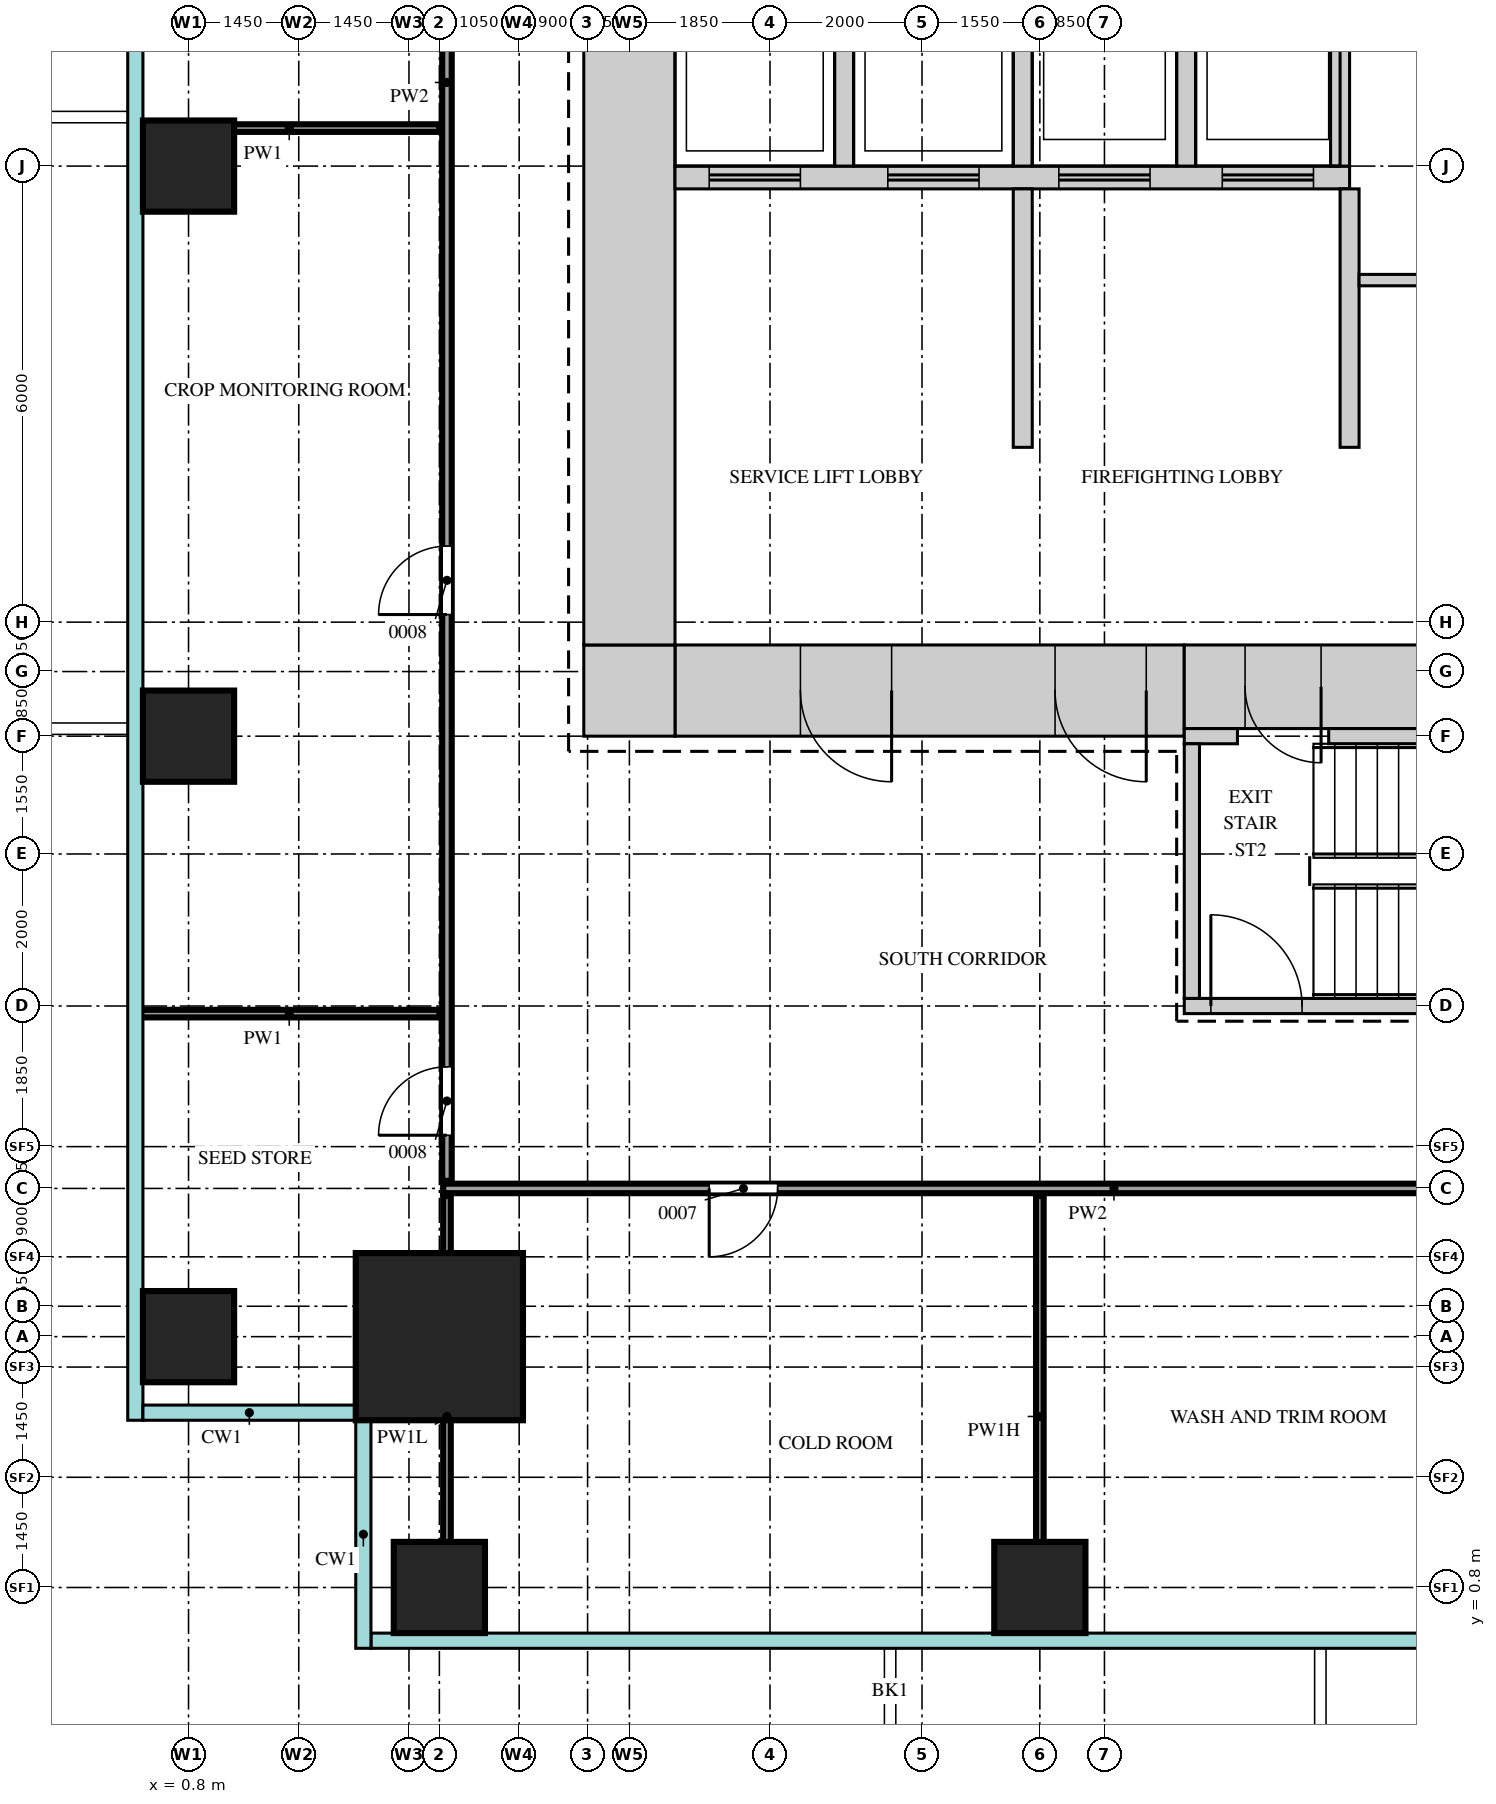
"""IFC4 building model, lengths in metres.
Left out: names, types, materials, properties, quantities, classifications, styles, units other than length and angle.
Written with IfcOpenShell. Run it as: python <this file> out.ifc"""

import sys

from ifc_helpers import new_model, si_unit, direction, frame, frame_2d, origin, origin_2d, place, context, subcontext, project, spatial, rectangle, extrude, source, transform, mapped, element, fill, save


model = new_model("IFC4")
c1 = context("Model", 3, precision=1e-05, world=origin(), true_north=direction((0.0, 1.0)))
c2 = subcontext(c1, "Body", "Model", "MODEL_VIEW")
j1 = project(units=[si_unit("LENGTHUNIT", "METRE"), si_unit("PLANEANGLEUNIT", "RADIAN")], contexts=[c1])
p1 = place(None, origin())
s1 = spatial("IfcSite", under=j1, at=p1, CompositionType="ELEMENT")
p2 = place(p1, origin())
s2 = spatial("IfcBuilding", under=s1, at=p2, CompositionType="ELEMENT")
p3 = place(p2, frame((0.0, 0.0, 37.5)))
s3 = spatial("IfcBuildingStorey", under=s2, at=p3, CompositionType="ELEMENT", Elevation=37.5)
m1 = source(origin(), c2, "Body", "SweptSolid", [
    extrude(rectangle(XDim=6.7, YDim=1.2, at=frame_2d((3.35, 0.0))), origin(), (0.0, 0.0, 1.0), 4.2),
])
p4 = place(p3, frame((7.2, 12.6, 0.0), z_axis=(0.0, 0.0, 1.0), x_axis=(1.0, 0.0, 0.0)))
e1 = element("IfcWall", 1, at=p4, inside=s3, PredefinedType="SHEAR", context=c2, shape_type="MappedRepresentation", body=[
    mapped(m1, transform((0.0, 0.0, 0.0))),
])
m2 = source(origin(), c2, "Body", "SweptSolid", [
    extrude(rectangle(XDim=1.2, YDim=2.1, at=frame_2d((0.6, 1.05))), frame((0.0, 0.61, 0.0), z_axis=(0.0, -1.0, 0.0), x_axis=(1.0, 0.0, 0.0)), (0.0, 0.0, 1.0), 1.22),
])
p5 = place(p4, frame((5.0, 0.0, 0.0)))
e2 = element("IfcOpeningElement", 2, at=p5, cuts=e1, PredefinedType="OPENING", context=c2, shape_type="MappedRepresentation", body=[
    mapped(m2, transform((0.0, 0.0, 0.0))),
])
p6 = place(p4, frame((1.65, 0.0, 0.0)))
e3 = element("IfcOpeningElement", 3, at=p6, cuts=e1, PredefinedType="OPENING", context=c2, shape_type="MappedRepresentation", body=[
    mapped(m2, transform((0.0, 0.0, 0.0))),
])
m3 = source(origin(), c2, "Body", "SweptSolid", [
    extrude(rectangle(XDim=7.2, YDim=1.1, at=frame_2d((3.6, 0.0))), origin(), (0.0, 0.0, 1.0), 4.2),
])
p7 = place(p3, frame((13.9, 12.65, 0.0), z_axis=(0.0, 0.0, 1.0), x_axis=(1.0, 0.0, 0.0)))
e4 = element("IfcWall", 4, at=p7, inside=s3, PredefinedType="SHEAR", context=c2, shape_type="MappedRepresentation", body=[
    mapped(m3, transform((0.0, 0.0, 0.0))),
])
m4 = source(origin(), c2, "Body", "SweptSolid", [
    extrude(rectangle(XDim=1.0, YDim=2.1, at=frame_2d((0.5, 1.05))), frame((0.0, 0.56, 0.0), z_axis=(0.0, -1.0, 0.0), x_axis=(1.0, 0.0, 0.0)), (0.0, 0.0, 1.0), 1.12),
])
p8 = place(p7, frame((0.8, 0.0, 0.0)))
e5 = element("IfcOpeningElement", 5, at=p8, cuts=e4, PredefinedType="OPENING", context=c2, shape_type="MappedRepresentation", body=[
    mapped(m4, transform((0.0, 0.0, 0.0))),
])
m5 = source(origin(), c2, "Body", "SweptSolid", [
    extrude(rectangle(XDim=1.2, YDim=1.2, at=frame_2d((0.6, 0.0))), origin(), (0.0, 0.0, 1.0), 4.2),
])
p9 = place(p3, frame((6.0, 12.6, 0.0), z_axis=(0.0, 0.0, 1.0), x_axis=(1.0, 0.0, 0.0)))
e6 = element("IfcWall", 6, at=p9, inside=s3, PredefinedType="SHEAR", context=c2, shape_type="MappedRepresentation", body=[
    mapped(m5, transform((0.0, 0.0, 0.0))),
])
m6 = source(origin(), c2, "Body", "SweptSolid", [
    extrude(rectangle(XDim=27.6, YDim=1.2, at=frame_2d((13.8, 0.0))), origin(), (0.0, 0.0, 1.0), 4.2),
])
p10 = place(p3, frame((6.6, 13.2, 0.0), z_axis=(0.0, 0.0, 1.0), x_axis=(0.0, 1.0, 0.0)))
e7 = element("IfcWall", 7, at=p10, inside=s3, PredefinedType="SHEAR", context=c2, shape_type="MappedRepresentation", body=[
    mapped(m6, transform((0.0, 0.0, 0.0))),
])
m7 = source(origin(), c2, "Body", "SweptSolid", [
    extrude(rectangle(XDim=0.7, YDim=0.2, at=frame_2d((0.35, 0.0))), origin(), (0.0, 0.0, 1.0), 4.2),
])
p11 = place(p3, frame((13.9, 12.0, 0.0), z_axis=(0.0, 0.0, 1.0), x_axis=(1.0, 0.0, 0.0)))
e8 = element("IfcWall", 8, at=p11, inside=s3, PredefinedType="SHEAR", context=c2, shape_type="MappedRepresentation", body=[
    mapped(m7, transform((0.0, 0.0, 0.0))),
])
m8 = source(origin(), c2, "Body", "SweptSolid", [
    extrude(rectangle(XDim=5.3, YDim=0.2, at=frame_2d((2.65, 0.0))), origin(), (0.0, 0.0, 1.0), 4.2),
])
p12 = place(p3, frame((15.8, 12.0, 0.0), z_axis=(0.0, 0.0, 1.0), x_axis=(1.0, 0.0, 0.0)))
e9 = element("IfcWall", 9, at=p12, inside=s3, PredefinedType="SHEAR", context=c2, shape_type="MappedRepresentation", body=[
    mapped(m8, transform((0.0, 0.0, 0.0))),
])
m9 = source(origin(), c2, "Body", "SweptSolid", [
    extrude(rectangle(XDim=7.2, YDim=0.2, at=frame_2d((3.6, 0.0))), origin(), (0.0, 0.0, 1.0), 4.2),
])
p13 = place(p3, frame((13.9, 8.45, 0.0), z_axis=(0.0, 0.0, 1.0), x_axis=(1.0, 0.0, 0.0)))
e10 = element("IfcWall", 10, at=p13, inside=s3, PredefinedType="SHEAR", context=c2, shape_type="MappedRepresentation", body=[
    mapped(m9, transform((0.0, 0.0, 0.0))),
])
m10 = source(origin(), c2, "Body", "SweptSolid", [
    extrude(rectangle(XDim=1.2, YDim=2.1, at=frame_2d((0.6, 1.05))), frame((0.0, 0.11, 0.0), z_axis=(0.0, -1.0, 0.0), x_axis=(1.0, 0.0, 0.0)), (0.0, 0.0, 1.0), 0.22),
])
p14 = place(p13, frame((0.35, 0.0, 0.0)))
e11 = element("IfcOpeningElement", 11, at=p14, cuts=e10, PredefinedType="OPENING", context=c2, shape_type="MappedRepresentation", body=[
    mapped(m10, transform((0.0, 0.0, 0.0))),
])
m11 = source(origin(), c2, "Body", "SweptSolid", [
    extrude(rectangle(XDim=3.35, YDim=0.2, at=frame_2d((1.675, 0.0))), origin(), (0.0, 0.0, 1.0), 4.2),
])
p15 = place(p3, frame((14.0, 8.55, 0.0), z_axis=(0.0, 0.0, 1.0), x_axis=(0.0, 1.0, 0.0)))
e12 = element("IfcWall", 12, at=p15, inside=s3, PredefinedType="SHEAR", context=c2, shape_type="MappedRepresentation", body=[
    mapped(m11, transform((0.0, 0.0, 0.0))),
])
m12 = source(origin(), c2, "Body", "SweptSolid", [
    extrude(rectangle(XDim=8.875, YDim=0.3, at=frame_2d((4.438, 0.0))), origin(), (0.0, 0.0, 1.0), 4.2),
])
p16 = place(p3, frame((7.2, 19.35, 0.0), z_axis=(0.0, 0.0, 1.0), x_axis=(1.0, 0.0, 0.0)))
e13 = element("IfcWall", 13, at=p16, inside=s3, PredefinedType="STANDARD", context=c2, shape_type="MappedRepresentation", body=[
    mapped(m12, transform((0.0, 0.0, 0.0))),
])
m13 = source(origin(), c2, "Body", "SweptSolid", [
    extrude(rectangle(XDim=1.2, YDim=2.1, at=frame_2d((0.6, 1.05))), frame((0.0, 0.16, 0.0), z_axis=(0.0, -1.0, 0.0), x_axis=(1.0, 0.0, 0.0)), (0.0, 0.0, 1.0), 0.32),
])
p17 = place(p16, frame((0.45, 0.0, 0.0)))
e14 = element("IfcOpeningElement", 14, at=p17, cuts=e13, PredefinedType="OPENING", context=c2, shape_type="MappedRepresentation", body=[
    mapped(m13, transform((0.0, 0.0, 0.0))),
])
p18 = place(p16, frame((2.8, 0.0, 0.0)))
e15 = element("IfcOpeningElement", 15, at=p18, cuts=e13, PredefinedType="OPENING", context=c2, shape_type="MappedRepresentation", body=[
    mapped(m13, transform((0.0, 0.0, 0.0))),
])
p19 = place(p16, frame((5.05, 0.0, 0.0)))
e16 = element("IfcOpeningElement", 16, at=p19, cuts=e13, PredefinedType="OPENING", context=c2, shape_type="MappedRepresentation", body=[
    mapped(m13, transform((0.0, 0.0, 0.0))),
])
p20 = place(p16, frame((7.2, 0.0, 0.0)))
e17 = element("IfcOpeningElement", 17, at=p20, cuts=e13, PredefinedType="OPENING", context=c2, shape_type="MappedRepresentation", body=[
    mapped(m13, transform((0.0, 0.0, 0.0))),
])
m14 = source(origin(), c2, "Body", "SweptSolid", [
    extrude(rectangle(XDim=3.1, YDim=0.25, at=frame_2d((1.55, 0.0))), origin(), (0.0, 0.0, 1.0), 4.2),
])
for number, where, z_axis, x_axis in (
    (18, (9.425, 19.5, 0.0), (0.0, 0.0, 1.0), (0.0, 1.0, 0.0)),
    (19, (11.775, 19.5, 0.0), (0.0, 0.0, 1.0), (0.0, 1.0, 0.0)),
    (20, (13.925, 19.5, 0.0), (0.0, 0.0, 1.0), (0.0, 1.0, 0.0)),
    (21, (15.95, 19.5, 0.0), (0.0, 0.0, 1.0), (0.0, 1.0, 0.0)),
):
    element("IfcWall", number, at=place(p3, frame(where, z_axis=z_axis, x_axis=x_axis)), inside=s3, PredefinedType="STANDARD", context=c2, shape_type="MappedRepresentation", body=[
        mapped(m14, transform((0.0, 0.0, 0.0))),
    ])
m15 = source(origin(), c2, "Body", "SweptSolid", [
    extrude(rectangle(XDim=3.4, YDim=0.25, at=frame_2d((1.7, 0.0))), origin(), (0.0, 0.0, 1.0), 4.2),
])
for number, where, z_axis, x_axis in (
    (22, (16.075, 15.8, 0.0), (0.0, 0.0, 1.0), (0.0, 1.0, 0.0)),
    (23, (11.775, 15.8, 0.0), (0.0, 0.0, 1.0), (0.0, 1.0, 0.0)),
):
    element("IfcWall", number, at=place(p3, frame(where, z_axis=z_axis, x_axis=x_axis)), inside=s3, PredefinedType="STANDARD", context=c2, shape_type="MappedRepresentation", body=[
        mapped(m15, transform((0.0, 0.0, 0.0))),
    ])
m16 = source(origin(), c2, "Body", "SweptSolid", [
    extrude(rectangle(XDim=2.2, YDim=2.2, at=origin_2d()), origin(), (0.0, 0.0, 1.0), 4.5),
])
p21 = place(p3, frame((4.1, 4.1, 0.0), z_axis=(0.0, 0.0, 1.0), x_axis=(1.0, 0.0, 0.0)))
e24 = element("IfcColumn", 24, at=p21, inside=s3, PredefinedType="COLUMN", context=c2, shape_type="MappedRepresentation", body=[
    mapped(m16, transform((0.0, 0.0, 0.0))),
])
m17 = source(origin(), c2, "Body", "SweptSolid", [
    extrude(rectangle(XDim=1.2, YDim=1.2, at=origin_2d()), origin(), (0.0, 0.0, 1.0), 4.2),
])
for number, where, z_axis, x_axis in (
    (25, (4.1, 0.8, 0.0), (0.0, 0.0, 1.0), (1.0, 0.0, 0.0)),
    (26, (12.0, 0.8, 0.0), (0.0, 0.0, 1.0), (1.0, 0.0, 0.0)),
    (27, (0.8, 4.1, 0.0), (0.0, 0.0, 1.0), (1.0, 0.0, 0.0)),
    (28, (0.8, 12.0, 0.0), (0.0, 0.0, 1.0), (1.0, 0.0, 0.0)),
    (29, (0.8, 19.5, 0.0), (0.0, 0.0, 1.0), (1.0, 0.0, 0.0)),
):
    element("IfcColumn", number, at=place(p3, frame(where, z_axis=z_axis, x_axis=x_axis)), inside=s3, PredefinedType="COLUMN", context=c2, shape_type="MappedRepresentation", body=[
        mapped(m17, transform((0.0, 0.0, 0.0))),
    ])
m18 = source(origin(), c2, "Body", "SweptSolid", [
    extrude(rectangle(XDim=5.8, YDim=0.1, at=frame_2d((2.9, 0.0))), origin(), (0.0, 0.0, 1.0), 3.6),
])
p22 = place(p3, frame((4.2, 0.15, 0.0), z_axis=(0.0, 0.0, 1.0), x_axis=(0.0, 1.0, 0.0)))
e30 = element("IfcWall", 30, at=p22, inside=s3, PredefinedType="PARTITIONING", context=c2, shape_type="MappedRepresentation", body=[
    mapped(m18, transform((0.0, 0.0, 0.0))),
])
m19 = source(origin(), c2, "Body", "SweptSolid", [
    extrude(rectangle(XDim=5.8, YDim=0.1, at=frame_2d((2.9, 0.0))), origin(), (0.0, 0.0, 1.0), 3.7),
])
p23 = place(p3, frame((12.0, 0.15, 0.0), z_axis=(0.0, 0.0, 1.0), x_axis=(0.0, 1.0, 0.0)))
e31 = element("IfcWall", 31, at=p23, inside=s3, PredefinedType="PARTITIONING", context=c2, shape_type="MappedRepresentation", body=[
    mapped(m19, transform((0.0, 0.0, 0.0))),
])
m20 = source(origin(), c2, "Body", "SweptSolid", [
    extrude(rectangle(XDim=22.15, YDim=0.125, at=frame_2d((11.075, 0.0))), origin(), (0.0, 0.0, 1.0), 4.3),
])
p24 = place(p3, frame((4.15, 6.05, 0.0), z_axis=(0.0, 0.0, 1.0), x_axis=(1.0, 0.0, 0.0)))
e32 = element("IfcWall", 32, at=p24, inside=s3, PredefinedType="PARTITIONING", context=c2, shape_type="MappedRepresentation", body=[
    mapped(m20, transform((0.0, 0.0, 0.0))),
])
m21 = source(origin(), c2, "Body", "SweptSolid", [
    extrude(rectangle(XDim=0.9, YDim=2.1, at=frame_2d((0.45, 1.05))), frame((0.0, 0.073, 0.0), z_axis=(0.0, -1.0, 0.0), x_axis=(1.0, 0.0, 0.0)), (0.0, 0.0, 1.0), 0.145),
])
p25 = place(p24, frame((3.5, 0.0, 0.0)))
e33 = element("IfcOpeningElement", 33, at=p25, cuts=e32, PredefinedType="OPENING", context=c2, shape_type="MappedRepresentation", body=[
    mapped(m21, transform((0.0, 0.0, 0.0))),
])
m22 = source(origin(), c2, "Body", "SweptSolid", [
    extrude(rectangle(XDim=1.2, YDim=2.1, at=frame_2d((0.6, 1.05))), frame((0.0, 0.073, 0.0), z_axis=(0.0, -1.0, 0.0), x_axis=(1.0, 0.0, 0.0)), (0.0, 0.0, 1.0), 0.145),
])
p26 = place(p24, frame((13.25, 0.0, 0.0)))
e34 = element("IfcOpeningElement", 34, at=p26, cuts=e32, PredefinedType="OPENING", context=c2, shape_type="MappedRepresentation", body=[
    mapped(m22, transform((0.0, 0.0, 0.0))),
])
m23 = source(origin(), c2, "Body", "SweptSolid", [
    extrude(rectangle(XDim=27.75, YDim=0.125, at=frame_2d((13.875, 0.0))), origin(), (0.0, 0.0, 1.0), 4.3),
])
p27 = place(p3, frame((4.2, 6.15, 0.0), z_axis=(0.0, 0.0, 1.0), x_axis=(0.0, 1.0, 0.0)))
e35 = element("IfcWall", 35, at=p27, inside=s3, PredefinedType="PARTITIONING", context=c2, shape_type="MappedRepresentation", body=[
    mapped(m23, transform((0.0, 0.0, 0.0))),
])
p28 = place(p27, frame((0.6, 0.0, 0.0)))
e36 = element("IfcOpeningElement", 36, at=p28, cuts=e35, PredefinedType="OPENING", context=c2, shape_type="MappedRepresentation", body=[
    mapped(m21, transform((0.0, 0.0, 0.0))),
])
p29 = place(p27, frame((7.45, 0.0, 0.0)))
e37 = element("IfcOpeningElement", 37, at=p29, cuts=e35, PredefinedType="OPENING", context=c2, shape_type="MappedRepresentation", body=[
    mapped(m21, transform((0.0, 0.0, 0.0))),
])
p30 = place(p27, frame((20.55, 0.0, 0.0)))
e38 = element("IfcOpeningElement", 38, at=p30, cuts=e35, PredefinedType="OPENING", context=c2, shape_type="MappedRepresentation", body=[
    mapped(m21, transform((0.0, 0.0, 0.0))),
])
m24 = source(origin(), c2, "Body", "SweptSolid", [
    extrude(rectangle(XDim=3.95, YDim=0.1, at=frame_2d((1.975, 0.0))), origin(), (0.0, 0.0, 1.0), 4.3),
])
p31 = place(p3, frame((0.15, 8.35, 0.0), z_axis=(0.0, 0.0, 1.0), x_axis=(1.0, 0.0, 0.0)))
e39 = element("IfcWall", 39, at=p31, inside=s3, PredefinedType="PARTITIONING", context=c2, shape_type="MappedRepresentation", body=[
    mapped(m24, transform((0.0, 0.0, 0.0))),
])
m25 = source(origin(), c2, "Body", "SweptSolid", [
    extrude(rectangle(XDim=6.6, YDim=0.15, at=frame_2d((3.3, 0.0))), origin(), (0.0, 0.0, 1.0), 4.3),
])
p32 = place(p3, frame((16.2, 18.0, 0.0), z_axis=(0.0, 0.0, 1.0), x_axis=(1.0, 0.0, 0.0)))
e40 = element("IfcWall", 40, at=p32, inside=s3, PredefinedType="PARTITIONING", context=c2, shape_type="MappedRepresentation", body=[
    mapped(m25, transform((0.0, 0.0, 0.0))),
])
p33 = place(p3, frame((0.15, 20.0, 0.0), z_axis=(0.0, 0.0, 1.0), x_axis=(1.0, 0.0, 0.0)))
e41 = element("IfcWall", 41, at=p33, inside=s3, PredefinedType="PARTITIONING", context=c2, shape_type="MappedRepresentation", body=[
    mapped(m24, transform((0.0, 0.0, 0.0))),
])
m26 = source(origin(), c2, "Body", "SweptSolid", [
    extrude(rectangle(XDim=1.2, YDim=2.1, at=frame_2d((0.6, 1.05))), frame((0.0, 0.55, 0.0), z_axis=(0.0, -1.0, 0.0), x_axis=(1.0, 0.0, 0.0)), (0.0, 0.0, 1.0), 1.1),
])
p34 = place(p5, origin())
e42 = element("IfcDoor", 42, at=p34, inside=s3, OperationType="SINGLE_SWING_RIGHT", PredefinedType="DOOR", context=c2, shape_type="MappedRepresentation", body=[
    mapped(m26, transform((0.0, 0.0, 0.0))),
])
fill(e2, e42)
p35 = place(p6, origin())
e43 = element("IfcDoor", 43, at=p35, inside=s3, OperationType="SINGLE_SWING_RIGHT", PredefinedType="DOOR", context=c2, shape_type="MappedRepresentation", body=[
    mapped(m26, transform((0.0, 0.0, 0.0))),
])
fill(e3, e43)
m27 = source(origin(), c2, "Body", "SweptSolid", [
    extrude(rectangle(XDim=1.0, YDim=2.1, at=frame_2d((0.5, 1.05))), frame((0.0, 0.5, 0.0), z_axis=(0.0, -1.0, 0.0), x_axis=(1.0, 0.0, 0.0)), (0.0, 0.0, 1.0), 1.0),
])
p36 = place(p8, origin())
e44 = element("IfcDoor", 44, at=p36, inside=s3, OperationType="SINGLE_SWING_RIGHT", PredefinedType="DOOR", context=c2, shape_type="MappedRepresentation", body=[
    mapped(m27, transform((0.0, 0.0, 0.0))),
])
fill(e5, e44)
m28 = source(origin(), c2, "Body", "SweptSolid", [
    extrude(rectangle(XDim=0.9, YDim=2.1, at=frame_2d((0.45, 1.05))), frame((0.0, 0.025, 0.0), z_axis=(0.0, -1.0, 0.0), x_axis=(1.0, 0.0, 0.0)), (0.0, 0.0, 1.0), 0.05),
])
p37 = place(p28, origin())
e45 = element("IfcDoor", 45, at=p37, inside=s3, OperationType="SINGLE_SWING_RIGHT", PredefinedType="DOOR", context=c2, shape_type="MappedRepresentation", body=[
    mapped(m28, transform((0.0, 0.0, 0.0))),
])
fill(e36, e45)
p38 = place(p29, origin())
e46 = element("IfcDoor", 46, at=p38, inside=s3, OperationType="SINGLE_SWING_RIGHT", PredefinedType="DOOR", context=c2, shape_type="MappedRepresentation", body=[
    mapped(m28, transform((0.0, 0.0, 0.0))),
])
fill(e37, e46)
p39 = place(p25, origin())
e47 = element("IfcDoor", 47, at=p39, inside=s3, OperationType="SINGLE_SWING_LEFT", PredefinedType="DOOR", context=c2, shape_type="MappedRepresentation", body=[
    mapped(m28, transform((0.0, 0.0, 0.0))),
])
fill(e33, e47)
m29 = source(origin(), c2, "Body", "SweptSolid", [
    extrude(rectangle(XDim=1.2, YDim=2.1, at=frame_2d((0.6, 1.05))), frame((0.0, 0.025, 0.0), z_axis=(0.0, -1.0, 0.0), x_axis=(1.0, 0.0, 0.0)), (0.0, 0.0, 1.0), 0.05),
])
p40 = place(p14, origin())
e48 = element("IfcDoor", 48, at=p40, inside=s3, OperationType="SINGLE_SWING_RIGHT", PredefinedType="DOOR", context=c2, shape_type="MappedRepresentation", body=[
    mapped(m29, transform((0.0, 0.0, 0.0))),
])
fill(e11, e48)
p41 = place(p17, origin())
e49 = element("IfcDoor", 49, at=p41, inside=s3, OperationType="DOUBLE_DOOR_SLIDING", PredefinedType="DOOR", context=c2, shape_type="MappedRepresentation", body=[
    mapped(m29, transform((0.0, 0.0, 0.0))),
])
fill(e14, e49)
p42 = place(p18, origin())
e50 = element("IfcDoor", 50, at=p42, inside=s3, OperationType="DOUBLE_DOOR_SLIDING", PredefinedType="DOOR", context=c2, shape_type="MappedRepresentation", body=[
    mapped(m29, transform((0.0, 0.0, 0.0))),
])
fill(e15, e50)
p43 = place(p19, origin())
e51 = element("IfcDoor", 51, at=p43, inside=s3, OperationType="DOUBLE_DOOR_SLIDING", PredefinedType="DOOR", context=c2, shape_type="MappedRepresentation", body=[
    mapped(m29, transform((0.0, 0.0, 0.0))),
])
fill(e16, e51)
p44 = place(p20, origin())
e52 = element("IfcDoor", 52, at=p44, inside=s3, OperationType="DOUBLE_DOOR_SLIDING", PredefinedType="DOOR", context=c2, shape_type="MappedRepresentation", body=[
    mapped(m29, transform((0.0, 0.0, 0.0))),
])
fill(e17, e52)
save(model, sys.argv[1])
